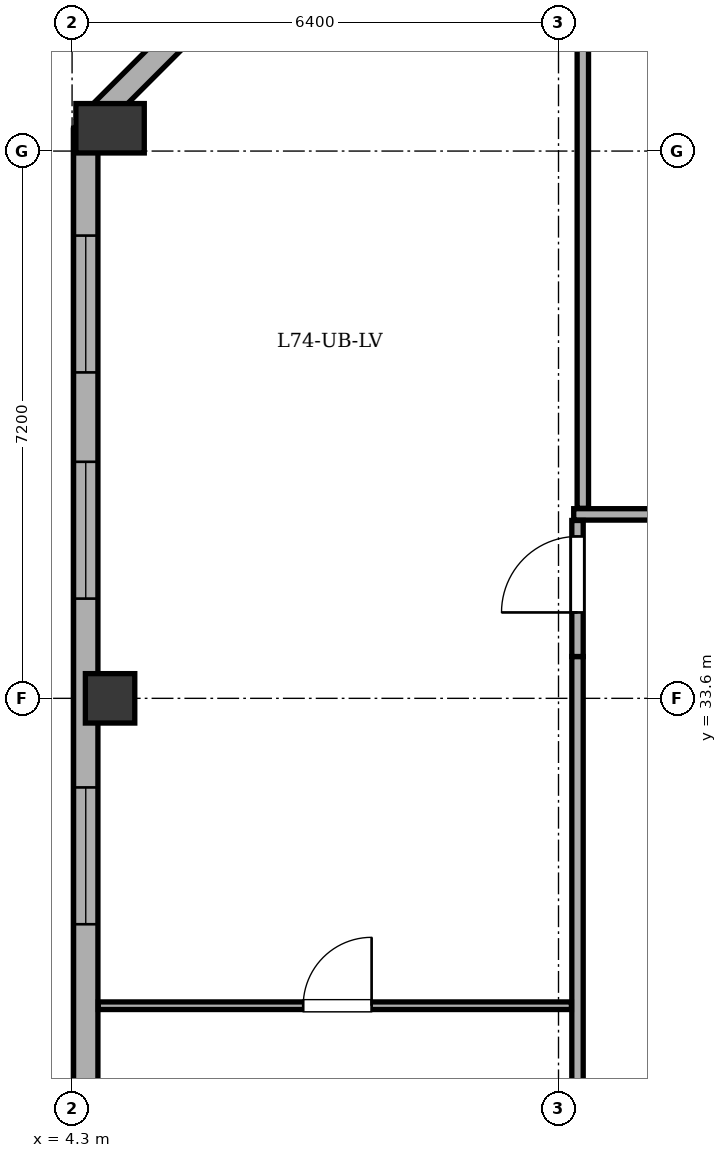
"""IFC4 building model, lengths in metres.
Left out: names, types, materials, properties, quantities, classifications, styles, units other than length and angle.
Written with IfcOpenShell. Run it as: python <this file> out.ifc"""

import sys

from ifc_helpers import new_model, si_unit, direction, frame, frame_2d, origin, origin_2d, place, context, subcontext, project, spatial, rectangle, extrude, element, fill, save


model = new_model("IFC4")
c1 = context("Model", 3, precision=1e-05, world=origin(), true_north=direction((0.0, 1.0)))
c2 = subcontext(c1, "Body", "Model", "MODEL_VIEW")
j1 = project(units=[si_unit("LENGTHUNIT", "METRE"), si_unit("PLANEANGLEUNIT", "RADIAN")], contexts=[c1])
p1 = place(None, origin())
s1 = spatial("IfcSite", under=j1, at=p1, CompositionType="ELEMENT")
p2 = place(p1, origin())
s2 = spatial("IfcBuilding", under=s1, at=p2, CompositionType="ELEMENT")
p3 = place(p2, frame((0.0, 0.0, 278.9)))
s3 = spatial("IfcBuildingStorey", under=s2, at=p3, CompositionType="ELEMENT", Elevation=278.9)
p4 = place(p3, frame((4.8, 33.6, 0.0), z_axis=(0.0, 0.0, 1.0), x_axis=(1.0, 0.0, 0.0)))
e1 = element("IfcColumn", 1, at=p4, inside=s3, PredefinedType="COLUMN", context=c2, shape_type="SweptSolid", body=[
    extrude(rectangle(XDim=0.65, YDim=0.65, at=origin_2d()), origin(), (0.0, 0.0, 1.0), 3.4),
])
p5 = place(p3, frame((4.8, 41.1, 0.0), z_axis=(0.0, 0.0, 1.0), x_axis=(1.0, 0.0, 0.0)))
e2 = element("IfcColumn", 2, at=p5, inside=s3, PredefinedType="COLUMN", context=c2, shape_type="SweptSolid", body=[
    extrude(rectangle(XDim=0.65, YDim=0.9, at=origin_2d()), origin(), (0.0, 0.0, 1.0), 3.4),
])
p6 = place(p3, frame((4.48, 19.85, 0.0), z_axis=(0.0, 0.0, 1.0), x_axis=(0.0, 1.0, 0.0)))
e3 = element("IfcWall", 3, at=p6, inside=s3, PredefinedType="STANDARD", context=c2, shape_type="SweptSolid", body=[
    extrude(rectangle(XDim=21.25, YDim=0.32, at=frame_2d((10.625, 0.0))), origin(), (0.0, 0.0, 1.0), 2.575),
])
p7 = place(p6, frame((3.751, 0.0, 0.75)))
e4 = element("IfcOpeningElement", 4, at=p7, cuts=e3, PredefinedType="OPENING", context=c2, shape_type="SweptSolid", body=[
    extrude(rectangle(XDim=1.8, YDim=1.7, at=frame_2d((0.9, 0.85))), frame((0.0, 0.17, 0.0), z_axis=(0.0, -1.0, 0.0), x_axis=(1.0, 0.0, 0.0)), (0.0, 0.0, 1.0), 0.34),
])
p8 = place(p6, frame((6.705, 0.0, 0.75)))
e5 = element("IfcOpeningElement", 5, at=p8, cuts=e3, PredefinedType="OPENING", context=c2, shape_type="SweptSolid", body=[
    extrude(rectangle(XDim=1.8, YDim=1.7, at=frame_2d((0.9, 0.85))), frame((0.0, 0.17, 0.0), z_axis=(0.0, -1.0, 0.0), x_axis=(1.0, 0.0, 0.0)), (0.0, 0.0, 1.0), 0.34),
])
p9 = place(p6, frame((10.778, 0.0, 0.75)))
e6 = element("IfcOpeningElement", 6, at=p9, cuts=e3, PredefinedType="OPENING", context=c2, shape_type="SweptSolid", body=[
    extrude(rectangle(XDim=1.8, YDim=1.7, at=frame_2d((0.9, 0.85))), frame((0.0, 0.17, 0.0), z_axis=(0.0, -1.0, 0.0), x_axis=(1.0, 0.0, 0.0)), (0.0, 0.0, 1.0), 0.34),
])
p10 = place(p6, frame((15.062, 0.0, 0.75)))
e7 = element("IfcOpeningElement", 7, at=p10, cuts=e3, PredefinedType="OPENING", context=c2, shape_type="SweptSolid", body=[
    extrude(rectangle(XDim=1.8, YDim=1.7, at=frame_2d((0.9, 0.85))), frame((0.0, 0.17, 0.0), z_axis=(0.0, -1.0, 0.0), x_axis=(1.0, 0.0, 0.0)), (0.0, 0.0, 1.0), 0.34),
])
p11 = place(p6, frame((18.038, 0.0, 0.75)))
e8 = element("IfcOpeningElement", 8, at=p11, cuts=e3, PredefinedType="OPENING", context=c2, shape_type="SweptSolid", body=[
    extrude(rectangle(XDim=1.8, YDim=1.7, at=frame_2d((0.9, 0.85))), frame((0.0, 0.17, 0.0), z_axis=(0.0, -1.0, 0.0), x_axis=(1.0, 0.0, 0.0)), (0.0, 0.0, 1.0), 0.34),
])
p12 = place(p3, frame((4.48, 41.1, 0.0), z_axis=(0.0, 0.0, 1.0), x_axis=(0.70712937715, 0.707084184501, 0.0)))
e9 = element("IfcWall", 9, at=p12, inside=s3, PredefinedType="STANDARD", context=c2, shape_type="SweptSolid", body=[
    extrude(rectangle(XDim=5.402, YDim=0.32, at=frame_2d((2.701, 0.0))), origin(), (0.0, 0.0, 1.0), 2.575),
])
p13 = place(p12, frame((2.001, 0.0, 0.75)))
e10 = element("IfcOpeningElement", 10, at=p13, cuts=e9, PredefinedType="OPENING", context=c2, shape_type="SweptSolid", body=[
    extrude(rectangle(XDim=1.4, YDim=1.65, at=frame_2d((0.7, 0.825))), frame((0.0, 0.17, 0.0), z_axis=(0.0, -1.0, 0.0), x_axis=(1.0, 0.0, 0.0)), (0.0, 0.0, 1.0), 0.34),
])
p14 = place(p3, frame((10.9, 36.02, 0.0), z_axis=(0.0, 0.0, 1.0), x_axis=(1.0, 0.0, 0.0)))
e11 = element("IfcWall", 11, at=p14, inside=s3, PredefinedType="PARTITIONING", context=c2, shape_type="SweptSolid", body=[
    extrude(rectangle(XDim=34.52, YDim=0.15, at=frame_2d((17.26, 0.0))), origin(), (0.0, 0.0, 1.0), 2.95),
])
p15 = place(p14, frame((16.76, 0.0, 0.0)))
e12 = element("IfcOpeningElement", 12, at=p15, cuts=e11, PredefinedType="OPENING", context=c2, shape_type="SweptSolid", body=[
    extrude(rectangle(XDim=1.0, YDim=2.1, at=frame_2d((0.5, 1.05))), frame((0.0, 0.085, 0.0), z_axis=(0.0, -1.0, 0.0), x_axis=(1.0, 0.0, 0.0)), (0.0, 0.0, 1.0), 0.17),
])
p16 = place(p3, frame((11.02, 36.1, 0.0), z_axis=(0.0, 0.0, 1.0), x_axis=(0.0, 1.0, 0.0)))
e13 = element("IfcWall", 13, at=p16, inside=s3, PredefinedType="PARTITIONING", context=c2, shape_type="SweptSolid", body=[
    extrude(rectangle(XDim=8.655, YDim=0.15, at=frame_2d((4.327, 0.0))), origin(), (0.0, 0.0, 1.0), 2.95),
])
p17 = place(p3, frame((10.95, 20.25, 0.0), z_axis=(0.0, 0.0, 1.0), x_axis=(0.0, 1.0, 0.0)))
e14 = element("IfcWall", 14, at=p17, inside=s3, PredefinedType="PARTITIONING", context=c2, shape_type="SweptSolid", body=[
    extrude(rectangle(XDim=13.9, YDim=0.15, at=frame_2d((6.95, 0.0))), origin(), (0.0, 0.0, 1.0), 2.95),
])
p18 = place(p3, frame((10.95, 34.15, 0.0), z_axis=(0.0, 0.0, 1.0), x_axis=(0.0, 1.0, 0.0)))
e15 = element("IfcWall", 15, at=p18, inside=s3, PredefinedType="PARTITIONING", context=c2, shape_type="SweptSolid", body=[
    extrude(rectangle(XDim=1.79, YDim=0.15, at=frame_2d((0.895, 0.0))), origin(), (0.0, 0.0, 1.0), 2.95),
])
p19 = place(p18, frame((0.58, 0.0, 0.0)))
e16 = element("IfcOpeningElement", 16, at=p19, cuts=e15, PredefinedType="OPENING", context=c2, shape_type="SweptSolid", body=[
    extrude(rectangle(XDim=1.0, YDim=2.1, at=frame_2d((0.5, 1.05))), frame((0.0, 0.085, 0.0), z_axis=(0.0, -1.0, 0.0), x_axis=(1.0, 0.0, 0.0)), (0.0, 0.0, 1.0), 0.17),
])
p20 = place(p3, frame((4.645, 29.556, 0.0), z_axis=(0.0, 0.0, 1.0), x_axis=(1.0, 0.0, 0.0)))
e17 = element("IfcWall", 17, at=p20, inside=s3, PredefinedType="PARTITIONING", context=c2, shape_type="SweptSolid", body=[
    extrude(rectangle(XDim=6.225, YDim=0.1, at=frame_2d((3.113, 0.0))), origin(), (0.0, 0.0, 1.0), 2.575),
])
p21 = place(p20, frame((2.696, 0.0, 0.0)))
e18 = element("IfcOpeningElement", 18, at=p21, cuts=e17, PredefinedType="OPENING", context=c2, shape_type="SweptSolid", body=[
    extrude(rectangle(XDim=0.9, YDim=2.05, at=frame_2d((0.45, 1.025))), frame((0.0, 0.06, 0.0), z_axis=(0.0, -1.0, 0.0), x_axis=(1.0, 0.0, 0.0)), (0.0, 0.0, 1.0), 0.12),
])
p22 = place(p9, origin())
e19 = element("IfcWindow", 19, at=p22, inside=s3, PartitioningType="SINGLE_PANEL", PredefinedType="WINDOW", context=c2, shape_type="SweptSolid", body=[
    extrude(rectangle(XDim=1.8, YDim=1.7, at=frame_2d((0.9, 0.85))), frame((0.0, -0.01, 0.0), z_axis=(0.0, -1.0, 0.0), x_axis=(1.0, 0.0, 0.0)), (0.0, 0.0, 1.0), 0.06),
])
fill(e6, e19)
p23 = place(p10, origin())
e20 = element("IfcWindow", 20, at=p23, inside=s3, PartitioningType="SINGLE_PANEL", PredefinedType="WINDOW", context=c2, shape_type="SweptSolid", body=[
    extrude(rectangle(XDim=1.8, YDim=1.7, at=frame_2d((0.9, 0.85))), frame((0.0, -0.01, 0.0), z_axis=(0.0, -1.0, 0.0), x_axis=(1.0, 0.0, 0.0)), (0.0, 0.0, 1.0), 0.06),
])
fill(e7, e20)
p24 = place(p11, origin())
e21 = element("IfcWindow", 21, at=p24, inside=s3, PartitioningType="SINGLE_PANEL", PredefinedType="WINDOW", context=c2, shape_type="SweptSolid", body=[
    extrude(rectangle(XDim=1.8, YDim=1.7, at=frame_2d((0.9, 0.85))), frame((0.0, -0.01, 0.0), z_axis=(0.0, -1.0, 0.0), x_axis=(1.0, 0.0, 0.0)), (0.0, 0.0, 1.0), 0.06),
])
fill(e8, e21)
p25 = place(p19, origin())
e22 = element("IfcDoor", 22, at=p25, inside=s3, OperationType="SINGLE_SWING_LEFT", PredefinedType="DOOR", context=c2, shape_type="SweptSolid", body=[
    extrude(rectangle(XDim=1.0, YDim=2.1, at=frame_2d((0.5, 1.05))), frame((0.0, 0.025, 0.0), z_axis=(0.0, -1.0, 0.0), x_axis=(1.0, 0.0, 0.0)), (0.0, 0.0, 1.0), 0.05),
])
fill(e16, e22)
p26 = place(p21, origin())
e23 = element("IfcDoor", 23, at=p26, inside=s3, OperationType="SINGLE_SWING_RIGHT", PredefinedType="DOOR", context=c2, shape_type="SweptSolid", body=[
    extrude(rectangle(XDim=0.9, YDim=2.05, at=frame_2d((0.45, 1.025))), frame((0.0, 0.025, 0.0), z_axis=(0.0, -1.0, 0.0), x_axis=(1.0, 0.0, 0.0)), (0.0, 0.0, 1.0), 0.05),
])
fill(e18, e23)
save(model, sys.argv[1])
